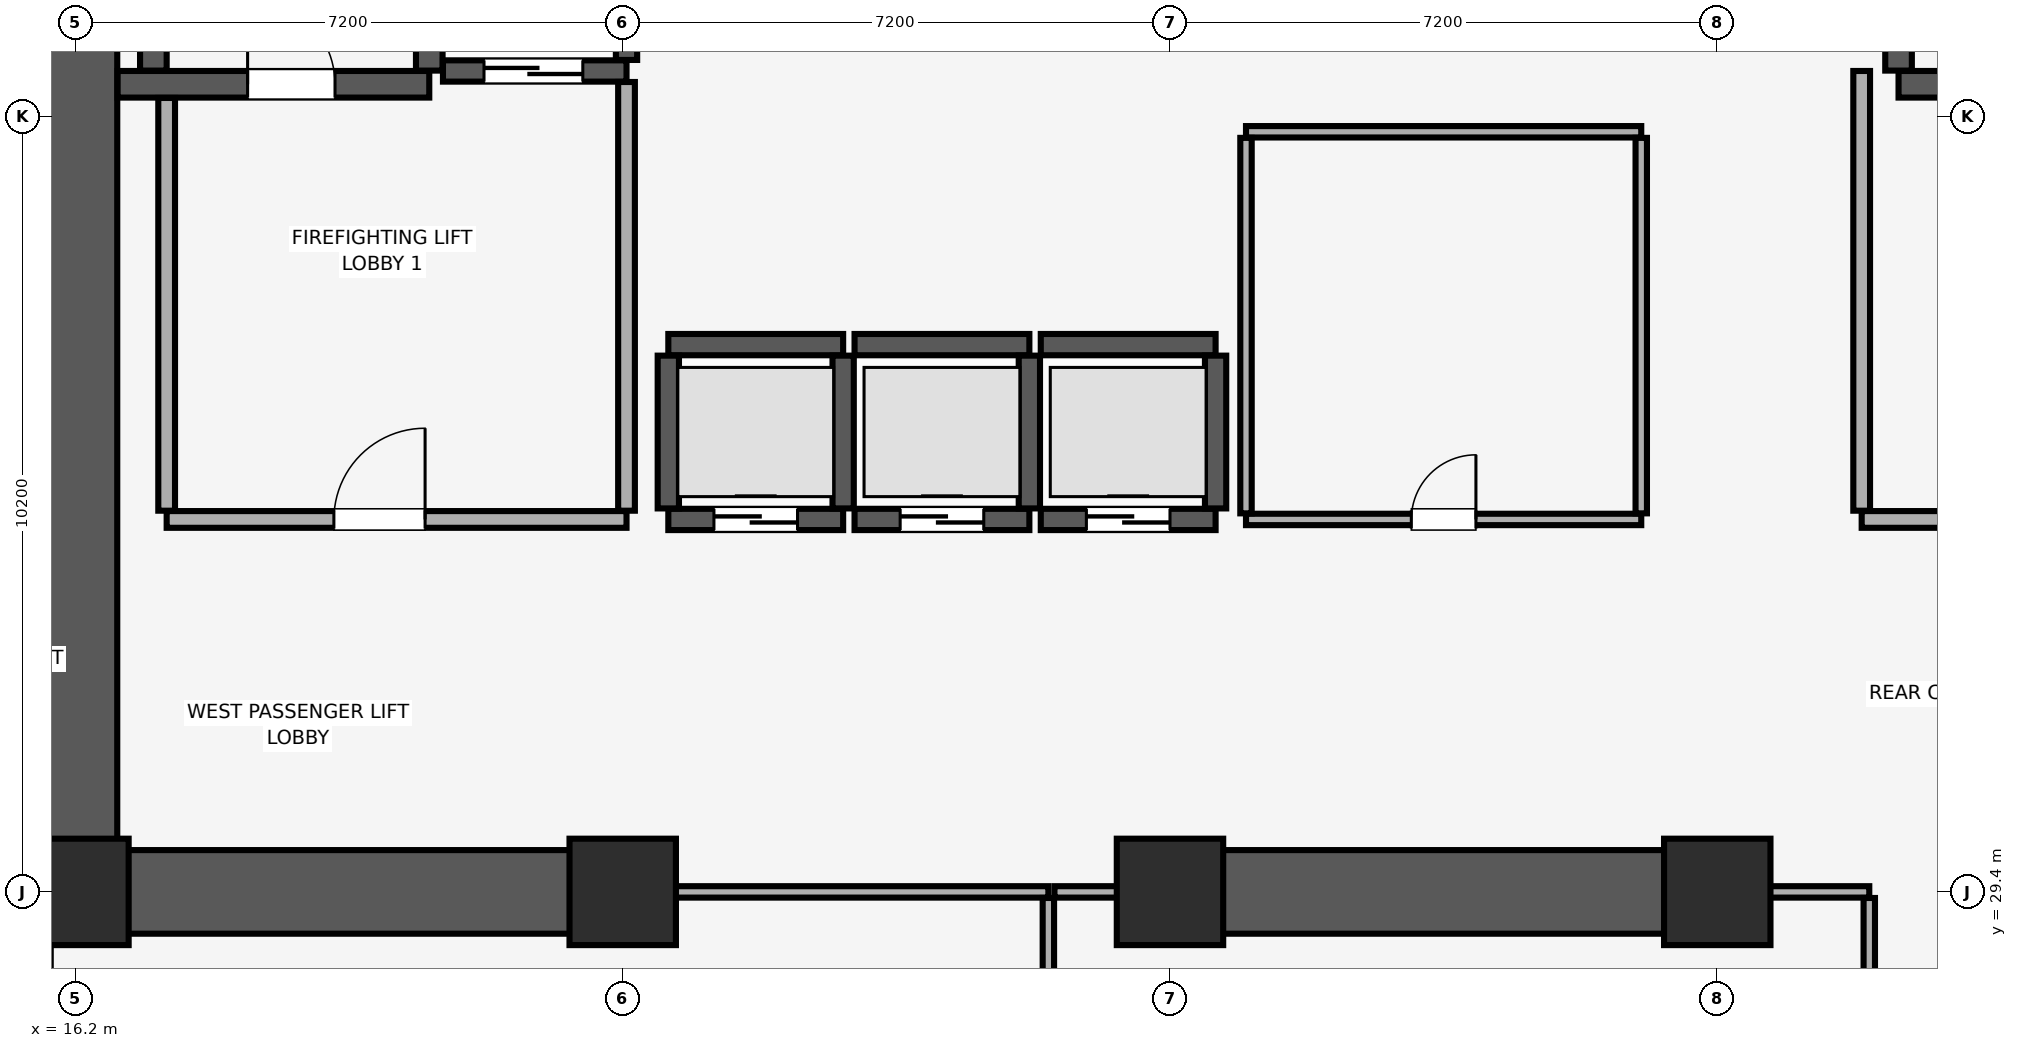
"""IFC4 building model, lengths in metres.
Left out: names, types, materials, properties, quantities, classifications, styles, units other than length and angle.
Written with IfcOpenShell. Run it as: python <this file> out.ifc"""

import sys

from ifc_helpers import new_model, si_unit, direction, frame, frame_2d, origin, origin_2d, place, context, subcontext, project, spatial, rectangle, extrude, element, fill, save


model = new_model("IFC4")
c1 = context("Model", 3, precision=1e-05, world=origin(), true_north=direction((0.0, 1.0)))
c2 = subcontext(c1, "Body", "Model", "MODEL_VIEW")
j1 = project(units=[si_unit("LENGTHUNIT", "METRE"), si_unit("PLANEANGLEUNIT", "RADIAN")], contexts=[c1])
p1 = place(None, origin())
s1 = spatial("IfcSite", under=j1, at=p1, CompositionType="ELEMENT")
p2 = place(p1, origin())
s2 = spatial("IfcBuilding", under=s1, at=p2, CompositionType="ELEMENT")
p3 = place(p2, frame((0.0, 0.0, 57.65)))
s3 = spatial("IfcBuildingStorey", under=s2, at=p3, CompositionType="ELEMENT", Elevation=57.65)
for number, where, z_axis, x_axis in (
    (1, (16.2, 29.4, 0.0), (0.0, 0.0, 1.0), (1.0, 0.0, 0.0)),
    (2, (23.4, 29.4, 0.0), (0.0, 0.0, 1.0), (1.0, 0.0, 0.0)),
    (3, (30.6, 29.4, 0.0), (0.0, 0.0, 1.0), (1.0, 0.0, 0.0)),
    (4, (37.8, 29.4, 0.0), (0.0, 0.0, 1.0), (1.0, 0.0, 0.0)),
):
    element("IfcColumn", number, at=place(p3, frame(where, z_axis=z_axis, x_axis=x_axis)), inside=s3, PredefinedType="COLUMN", context=c2, shape_type="SweptSolid", body=[
        extrude(rectangle(XDim=1.4, YDim=1.4, at=origin_2d()), origin(), (0.0, 0.0, 1.0), 3.51),
    ])
p4 = place(p3, frame((16.2, 29.4, 0.0), z_axis=(0.0, 0.0, 1.0), x_axis=(0.0, 1.0, 0.0)))
e5 = element("IfcWall", 5, at=p4, inside=s3, PredefinedType="SHEAR", context=c2, shape_type="SweptSolid", body=[
    extrude(rectangle(XDim=19.2, YDim=1.1, at=frame_2d((9.6, 0.0))), origin(), (0.0, 0.0, 1.0), 3.51),
])
p5 = place(p3, frame((16.755, 29.4, 0.0), z_axis=(0.0, 0.0, 1.0), x_axis=(1.0, 0.0, 0.0)))
e6 = element("IfcWall", 6, at=p5, inside=s3, PredefinedType="SHEAR", context=c2, shape_type="SweptSolid", body=[
    extrude(rectangle(XDim=6.845, YDim=1.1, at=frame_2d((3.423, 0.0))), origin(), (0.0, 0.0, 1.0), 3.51),
])
p6 = place(p3, frame((30.4, 29.4, 0.0), z_axis=(0.0, 0.0, 1.0), x_axis=(1.0, 0.0, 0.0)))
e7 = element("IfcWall", 7, at=p6, inside=s3, PredefinedType="SHEAR", context=c2, shape_type="SweptSolid", body=[
    extrude(rectangle(XDim=7.6, YDim=1.1, at=frame_2d((3.8, 0.0))), origin(), (0.0, 0.0, 1.0), 3.51),
])
p7 = place(p3, frame((16.755, 40.025, 0.0), z_axis=(0.0, 0.0, 1.0), x_axis=(1.0, 0.0, 0.0)))
e8 = element("IfcWall", 8, at=p7, inside=s3, PredefinedType="SHEAR", context=c2, shape_type="SweptSolid", body=[
    extrude(rectangle(XDim=4.1, YDim=0.35, at=frame_2d((2.05, 0.0))), origin(), (0.0, 0.0, 1.0), 3.51),
])
p8 = place(p7, frame((1.71, 0.0, 0.0)))
e9 = element("IfcOpeningElement", 9, at=p8, cuts=e8, PredefinedType="OPENING", context=c2, shape_type="SweptSolid", body=[
    extrude(rectangle(XDim=1.15, YDim=2.15, at=frame_2d((0.575, 1.075))), frame((0.0, 0.185, 0.0), z_axis=(0.0, -1.0, 0.0), x_axis=(1.0, 0.0, 0.0)), (0.0, 0.0, 1.0), 0.37),
])
for number, where, z_axis, x_axis in (
    (10, (17.225, 40.205, 0.0), (0.0, 0.0, 1.0), (0.0, 1.0, 0.0)),
    (11, (20.855, 40.205, 0.0), (0.0, 0.0, 1.0), (0.0, 1.0, 0.0)),
):
    element("IfcWall", number, at=place(p3, frame(where, z_axis=z_axis, x_axis=x_axis)), inside=s3, PredefinedType="SHEAR", context=c2, shape_type="SweptSolid", body=[
        extrude(rectangle(XDim=8.09, YDim=0.35, at=frame_2d((4.045, 0.0))), origin(), (0.0, 0.0, 1.0), 3.51),
    ])
p9 = place(p3, frame((40.185, 40.025, 0.0), z_axis=(0.0, 0.0, 1.0), x_axis=(1.0, 0.0, 0.0)))
e12 = element("IfcWall", 12, at=p9, inside=s3, PredefinedType="SHEAR", context=c2, shape_type="SweptSolid", body=[
    extrude(rectangle(XDim=3.63, YDim=0.35, at=frame_2d((1.815, 0.0))), origin(), (0.0, 0.0, 1.0), 3.51),
])
p10 = place(p9, frame((1.24, 0.0, 0.0)))
e13 = element("IfcOpeningElement", 13, at=p10, cuts=e12, PredefinedType="OPENING", context=c2, shape_type="SweptSolid", body=[
    extrude(rectangle(XDim=1.15, YDim=2.15, at=frame_2d((0.575, 1.075))), frame((0.0, 0.185, 0.0), z_axis=(0.0, -1.0, 0.0), x_axis=(1.0, 0.0, 0.0)), (0.0, 0.0, 1.0), 0.37),
])
p11 = place(p3, frame((40.185, 40.205, 0.0), z_axis=(0.0, 0.0, 1.0), x_axis=(0.0, 1.0, 0.0)))
e14 = element("IfcWall", 14, at=p11, inside=s3, PredefinedType="SHEAR", context=c2, shape_type="SweptSolid", body=[
    extrude(rectangle(XDim=8.09, YDim=0.35, at=frame_2d((4.045, 0.0))), origin(), (0.0, 0.0, 1.0), 3.51),
])
p12 = place(p3, frame((24.0, 34.3, 0.0), z_axis=(0.0, 0.0, 1.0), x_axis=(1.0, 0.0, 0.0)))
e15 = element("IfcWall", 15, at=p12, inside=s3, PredefinedType="SHEAR", context=c2, shape_type="SweptSolid", body=[
    extrude(rectangle(XDim=2.3, YDim=0.28, at=frame_2d((1.15, 0.0))), origin(), (0.0, 0.0, 1.0), 3.51),
])
p13 = place(p12, frame((0.6, 0.0, 0.0)))
e16 = element("IfcOpeningElement", 16, at=p13, cuts=e15, PredefinedType="OPENING", context=c2, shape_type="SweptSolid", body=[
    extrude(rectangle(XDim=1.1, YDim=2.2, at=frame_2d((0.55, 1.1))), frame((0.0, 0.15, 0.0), z_axis=(0.0, -1.0, 0.0), x_axis=(1.0, 0.0, 0.0)), (0.0, 0.0, 1.0), 0.3),
])
p14 = place(p3, frame((24.0, 36.6, 0.0), z_axis=(0.0, 0.0, 1.0), x_axis=(1.0, 0.0, 0.0)))
e17 = element("IfcWall", 17, at=p14, inside=s3, PredefinedType="SHEAR", context=c2, shape_type="SweptSolid", body=[
    extrude(rectangle(XDim=2.3, YDim=0.28, at=frame_2d((1.15, 0.0))), origin(), (0.0, 0.0, 1.0), 3.51),
])
for number, where, z_axis, x_axis in (
    (18, (24.0, 34.445, 0.0), (0.0, 0.0, 1.0), (0.0, 1.0, 0.0)),
    (19, (26.3, 34.445, 0.0), (0.0, 0.0, 1.0), (0.0, 1.0, 0.0)),
):
    element("IfcWall", number, at=place(p3, frame(where, z_axis=z_axis, x_axis=x_axis)), inside=s3, PredefinedType="SHEAR", context=c2, shape_type="SweptSolid", body=[
        extrude(rectangle(XDim=2.01, YDim=0.28, at=frame_2d((1.005, 0.0))), origin(), (0.0, 0.0, 1.0), 3.51),
    ])
p15 = place(p3, frame((26.45, 34.3, 0.0), z_axis=(0.0, 0.0, 1.0), x_axis=(1.0, 0.0, 0.0)))
e20 = element("IfcWall", 20, at=p15, inside=s3, PredefinedType="SHEAR", context=c2, shape_type="SweptSolid", body=[
    extrude(rectangle(XDim=2.3, YDim=0.28, at=frame_2d((1.15, 0.0))), origin(), (0.0, 0.0, 1.0), 3.51),
])
p16 = place(p15, frame((0.6, 0.0, 0.0)))
e21 = element("IfcOpeningElement", 21, at=p16, cuts=e20, PredefinedType="OPENING", context=c2, shape_type="SweptSolid", body=[
    extrude(rectangle(XDim=1.1, YDim=2.2, at=frame_2d((0.55, 1.1))), frame((0.0, 0.15, 0.0), z_axis=(0.0, -1.0, 0.0), x_axis=(1.0, 0.0, 0.0)), (0.0, 0.0, 1.0), 0.3),
])
p17 = place(p3, frame((26.45, 36.6, 0.0), z_axis=(0.0, 0.0, 1.0), x_axis=(1.0, 0.0, 0.0)))
e22 = element("IfcWall", 22, at=p17, inside=s3, PredefinedType="SHEAR", context=c2, shape_type="SweptSolid", body=[
    extrude(rectangle(XDim=2.3, YDim=0.28, at=frame_2d((1.15, 0.0))), origin(), (0.0, 0.0, 1.0), 3.51),
])
p18 = place(p3, frame((28.75, 34.445, 0.0), z_axis=(0.0, 0.0, 1.0), x_axis=(0.0, 1.0, 0.0)))
e23 = element("IfcWall", 23, at=p18, inside=s3, PredefinedType="SHEAR", context=c2, shape_type="SweptSolid", body=[
    extrude(rectangle(XDim=2.01, YDim=0.28, at=frame_2d((1.005, 0.0))), origin(), (0.0, 0.0, 1.0), 3.51),
])
p19 = place(p3, frame((28.9, 34.3, 0.0), z_axis=(0.0, 0.0, 1.0), x_axis=(1.0, 0.0, 0.0)))
e24 = element("IfcWall", 24, at=p19, inside=s3, PredefinedType="SHEAR", context=c2, shape_type="SweptSolid", body=[
    extrude(rectangle(XDim=2.3, YDim=0.28, at=frame_2d((1.15, 0.0))), origin(), (0.0, 0.0, 1.0), 3.51),
])
p20 = place(p19, frame((0.6, 0.0, 0.0)))
e25 = element("IfcOpeningElement", 25, at=p20, cuts=e24, PredefinedType="OPENING", context=c2, shape_type="SweptSolid", body=[
    extrude(rectangle(XDim=1.1, YDim=2.2, at=frame_2d((0.55, 1.1))), frame((0.0, 0.15, 0.0), z_axis=(0.0, -1.0, 0.0), x_axis=(1.0, 0.0, 0.0)), (0.0, 0.0, 1.0), 0.3),
])
p21 = place(p3, frame((28.9, 36.6, 0.0), z_axis=(0.0, 0.0, 1.0), x_axis=(1.0, 0.0, 0.0)))
e26 = element("IfcWall", 26, at=p21, inside=s3, PredefinedType="SHEAR", context=c2, shape_type="SweptSolid", body=[
    extrude(rectangle(XDim=2.3, YDim=0.28, at=frame_2d((1.15, 0.0))), origin(), (0.0, 0.0, 1.0), 3.51),
])
p22 = place(p3, frame((31.2, 34.445, 0.0), z_axis=(0.0, 0.0, 1.0), x_axis=(0.0, 1.0, 0.0)))
e27 = element("IfcWall", 27, at=p22, inside=s3, PredefinedType="SHEAR", context=c2, shape_type="SweptSolid", body=[
    extrude(rectangle(XDim=2.01, YDim=0.28, at=frame_2d((1.005, 0.0))), origin(), (0.0, 0.0, 1.0), 3.51),
])
p23 = place(p3, frame((21.035, 40.2, 0.0), z_axis=(0.0, 0.0, 1.0), x_axis=(1.0, 0.0, 0.0)))
e28 = element("IfcWall", 28, at=p23, inside=s3, PredefinedType="SHEAR", context=c2, shape_type="SweptSolid", body=[
    extrude(rectangle(XDim=2.415, YDim=0.28, at=frame_2d((1.208, 0.0))), origin(), (0.0, 0.0, 1.0), 3.51),
])
p24 = place(p23, frame((0.54, 0.0, 0.0)))
e29 = element("IfcOpeningElement", 29, at=p24, cuts=e28, PredefinedType="OPENING", context=c2, shape_type="SweptSolid", body=[
    extrude(rectangle(XDim=1.3, YDim=2.3, at=frame_2d((0.65, 1.15))), frame((0.0, 0.15, 0.0), z_axis=(0.0, -1.0, 0.0), x_axis=(1.0, 0.0, 0.0)), (0.0, 0.0, 1.0), 0.3),
])
p25 = place(p3, frame((23.45, 40.345, 0.0), z_axis=(0.0, 0.0, 1.0), x_axis=(0.0, 1.0, 0.0)))
e30 = element("IfcWall", 30, at=p25, inside=s3, PredefinedType="SHEAR", context=c2, shape_type="SweptSolid", body=[
    extrude(rectangle(XDim=2.81, YDim=0.28, at=frame_2d((1.405, 0.0))), origin(), (0.0, 0.0, 1.0), 3.51),
])
p26 = place(p3, frame((17.4, 34.3, 0.0), z_axis=(0.0, 0.0, 1.0), x_axis=(1.0, 0.0, 0.0)))
e31 = element("IfcWall", 31, at=p26, inside=s3, PredefinedType="PARTITIONING", context=c2, shape_type="SweptSolid", body=[
    extrude(rectangle(XDim=6.05, YDim=0.22, at=frame_2d((3.025, 0.0))), origin(), (0.0, 0.0, 1.0), 3.51),
])
p27 = place(p26, frame((2.2, 0.0, 0.0)))
e32 = element("IfcOpeningElement", 32, at=p27, cuts=e31, PredefinedType="OPENING", context=c2, shape_type="SweptSolid", body=[
    extrude(rectangle(XDim=1.2, YDim=2.15, at=frame_2d((0.6, 1.075))), frame((0.0, 0.12, 0.0), z_axis=(0.0, -1.0, 0.0), x_axis=(1.0, 0.0, 0.0)), (0.0, 0.0, 1.0), 0.24),
])
p28 = place(p3, frame((17.4, 34.415, 0.0), z_axis=(0.0, 0.0, 1.0), x_axis=(0.0, 1.0, 0.0)))
e33 = element("IfcWall", 33, at=p28, inside=s3, PredefinedType="PARTITIONING", context=c2, shape_type="SweptSolid", body=[
    extrude(rectangle(XDim=5.43, YDim=0.22, at=frame_2d((2.715, 0.0))), origin(), (0.0, 0.0, 1.0), 3.51),
])
p29 = place(p3, frame((23.45, 34.415, 0.0), z_axis=(0.0, 0.0, 1.0), x_axis=(0.0, 1.0, 0.0)))
e34 = element("IfcWall", 34, at=p29, inside=s3, PredefinedType="PARTITIONING", context=c2, shape_type="SweptSolid", body=[
    extrude(rectangle(XDim=5.64, YDim=0.22, at=frame_2d((2.82, 0.0))), origin(), (0.0, 0.0, 1.0), 3.51),
])
p30 = place(p3, frame((39.7, 34.3, 0.0), z_axis=(0.0, 0.0, 1.0), x_axis=(1.0, 0.0, 0.0)))
e35 = element("IfcWall", 35, at=p30, inside=s3, PredefinedType="PARTITIONING", context=c2, shape_type="SweptSolid", body=[
    extrude(rectangle(XDim=4.6, YDim=0.22, at=frame_2d((2.3, 0.0))), origin(), (0.0, 0.0, 1.0), 3.51),
])
p31 = place(p30, frame((1.7, 0.0, 0.0)))
e36 = element("IfcOpeningElement", 36, at=p31, cuts=e35, PredefinedType="OPENING", context=c2, shape_type="SweptSolid", body=[
    extrude(rectangle(XDim=1.2, YDim=2.15, at=frame_2d((0.6, 1.075))), frame((0.0, 0.12, 0.0), z_axis=(0.0, -1.0, 0.0), x_axis=(1.0, 0.0, 0.0)), (0.0, 0.0, 1.0), 0.24),
])
p32 = place(p3, frame((39.7, 34.415, 0.0), z_axis=(0.0, 0.0, 1.0), x_axis=(0.0, 1.0, 0.0)))
e37 = element("IfcWall", 37, at=p32, inside=s3, PredefinedType="PARTITIONING", context=c2, shape_type="SweptSolid", body=[
    extrude(rectangle(XDim=5.785, YDim=0.22, at=frame_2d((2.893, 0.0))), origin(), (0.0, 0.0, 1.0), 3.51),
])
p33 = place(p3, frame((31.6, 34.3, 0.0), z_axis=(0.0, 0.0, 1.0), x_axis=(1.0, 0.0, 0.0)))
e38 = element("IfcWall", 38, at=p33, inside=s3, PredefinedType="PARTITIONING", context=c2, shape_type="SweptSolid", body=[
    extrude(rectangle(XDim=5.2, YDim=0.15, at=frame_2d((2.6, 0.0))), origin(), (0.0, 0.0, 1.0), 3.51),
])
p34 = place(p33, frame((2.175, 0.0, 0.0)))
e39 = element("IfcOpeningElement", 39, at=p34, cuts=e38, PredefinedType="OPENING", context=c2, shape_type="SweptSolid", body=[
    extrude(rectangle(XDim=0.85, YDim=2.1, at=frame_2d((0.425, 1.05))), frame((0.0, 0.085, 0.0), z_axis=(0.0, -1.0, 0.0), x_axis=(1.0, 0.0, 0.0)), (0.0, 0.0, 1.0), 0.17),
])
p35 = place(p3, frame((31.6, 39.4, 0.0), z_axis=(0.0, 0.0, 1.0), x_axis=(1.0, 0.0, 0.0)))
e40 = element("IfcWall", 40, at=p35, inside=s3, PredefinedType="PARTITIONING", context=c2, shape_type="SweptSolid", body=[
    extrude(rectangle(XDim=5.2, YDim=0.15, at=frame_2d((2.6, 0.0))), origin(), (0.0, 0.0, 1.0), 3.51),
])
for number, where, z_axis, x_axis in (
    (41, (31.6, 34.38, 0.0), (0.0, 0.0, 1.0), (0.0, 1.0, 0.0)),
    (42, (36.8, 34.38, 0.0), (0.0, 0.0, 1.0), (0.0, 1.0, 0.0)),
):
    element("IfcWall", number, at=place(p3, frame(where, z_axis=z_axis, x_axis=x_axis)), inside=s3, PredefinedType="PARTITIONING", context=c2, shape_type="SweptSolid", body=[
        extrude(rectangle(XDim=4.94, YDim=0.15, at=frame_2d((2.47, 0.0))), origin(), (0.0, 0.0, 1.0), 3.51),
    ])
p36 = place(p3, frame((23.61, 29.4, 0.0), z_axis=(0.0, 0.0, 1.0), x_axis=(1.0, 0.0, 0.0)))
e43 = element("IfcWall", 43, at=p36, inside=s3, PredefinedType="PARTITIONING", context=c2, shape_type="SweptSolid", body=[
    extrude(rectangle(XDim=5.39, YDim=0.15, at=frame_2d((2.695, 0.0))), origin(), (0.0, 0.0, 1.0), 2.41),
])
p37 = place(p3, frame((29.0, 13.53, 0.0), z_axis=(0.0, 0.0, 1.0), x_axis=(0.0, 1.0, 0.0)))
e44 = element("IfcWall", 44, at=p37, inside=s3, PredefinedType="PARTITIONING", context=c2, shape_type="SweptSolid", body=[
    extrude(rectangle(XDim=15.79, YDim=0.15, at=frame_2d((7.895, 0.0))), origin(), (0.0, 0.0, 1.0), 3.51),
])
p38 = place(p3, frame((29.08, 29.4, 0.0), z_axis=(0.0, 0.0, 1.0), x_axis=(1.0, 0.0, 0.0)))
e45 = element("IfcWall", 45, at=p38, inside=s3, PredefinedType="PARTITIONING", context=c2, shape_type="SweptSolid", body=[
    extrude(rectangle(XDim=1.31, YDim=0.15, at=frame_2d((0.655, 0.0))), origin(), (0.0, 0.0, 1.0), 2.41),
])
p39 = place(p3, frame((38.01, 29.4, 0.0), z_axis=(0.0, 0.0, 1.0), x_axis=(1.0, 0.0, 0.0)))
e46 = element("IfcWall", 46, at=p39, inside=s3, PredefinedType="PARTITIONING", context=c2, shape_type="SweptSolid", body=[
    extrude(rectangle(XDim=1.79, YDim=0.15, at=frame_2d((0.895, 0.0))), origin(), (0.0, 0.0, 1.0), 2.41),
])
p40 = place(p3, frame((39.8, 13.53, 0.0), z_axis=(0.0, 0.0, 1.0), x_axis=(0.0, 1.0, 0.0)))
e47 = element("IfcWall", 47, at=p40, inside=s3, PredefinedType="PARTITIONING", context=c2, shape_type="SweptSolid", body=[
    extrude(rectangle(XDim=15.79, YDim=0.15, at=frame_2d((7.895, 0.0))), origin(), (0.0, 0.0, 1.0), 3.51),
])
p41 = place(p8, origin())
e48 = element("IfcDoor", 48, at=p41, inside=s3, OperationType="SINGLE_SWING_LEFT", PredefinedType="DOOR", context=c2, shape_type="SweptSolid", body=[
    extrude(rectangle(XDim=1.15, YDim=2.15, at=frame_2d((0.575, 1.075))), frame((0.0, 0.025, 0.0), z_axis=(0.0, -1.0, 0.0), x_axis=(1.0, 0.0, 0.0)), (0.0, 0.0, 1.0), 0.05),
])
fill(e9, e48)
p42 = place(p13, origin())
e49 = element("IfcDoor", 49, at=p42, inside=s3, OperationType="DOUBLE_DOOR_SLIDING", PredefinedType="DOOR", context=c2, shape_type="SweptSolid", body=[
    extrude(rectangle(XDim=1.1, YDim=2.2, at=frame_2d((0.55, 1.1))), frame((0.0, 0.025, 0.0), z_axis=(0.0, -1.0, 0.0), x_axis=(1.0, 0.0, 0.0)), (0.0, 0.0, 1.0), 0.05),
])
fill(e16, e49)
p43 = place(p16, origin())
e50 = element("IfcDoor", 50, at=p43, inside=s3, OperationType="DOUBLE_DOOR_SLIDING", PredefinedType="DOOR", context=c2, shape_type="SweptSolid", body=[
    extrude(rectangle(XDim=1.1, YDim=2.2, at=frame_2d((0.55, 1.1))), frame((0.0, 0.025, 0.0), z_axis=(0.0, -1.0, 0.0), x_axis=(1.0, 0.0, 0.0)), (0.0, 0.0, 1.0), 0.05),
])
fill(e21, e50)
p44 = place(p20, origin())
e51 = element("IfcDoor", 51, at=p44, inside=s3, OperationType="DOUBLE_DOOR_SLIDING", PredefinedType="DOOR", context=c2, shape_type="SweptSolid", body=[
    extrude(rectangle(XDim=1.1, YDim=2.2, at=frame_2d((0.55, 1.1))), frame((0.0, 0.025, 0.0), z_axis=(0.0, -1.0, 0.0), x_axis=(1.0, 0.0, 0.0)), (0.0, 0.0, 1.0), 0.05),
])
fill(e25, e51)
p45 = place(p24, origin())
e52 = element("IfcDoor", 52, at=p45, inside=s3, OperationType="DOUBLE_DOOR_SLIDING", PredefinedType="DOOR", context=c2, shape_type="SweptSolid", body=[
    extrude(rectangle(XDim=1.3, YDim=2.3, at=frame_2d((0.65, 1.15))), frame((0.0, 0.025, 0.0), z_axis=(0.0, -1.0, 0.0), x_axis=(1.0, 0.0, 0.0)), (0.0, 0.0, 1.0), 0.05),
])
fill(e29, e52)
p46 = place(p27, origin())
e53 = element("IfcDoor", 53, at=p46, inside=s3, OperationType="SINGLE_SWING_RIGHT", PredefinedType="DOOR", context=c2, shape_type="SweptSolid", body=[
    extrude(rectangle(XDim=1.2, YDim=2.15, at=frame_2d((0.6, 1.075))), frame((0.0, 0.025, 0.0), z_axis=(0.0, -1.0, 0.0), x_axis=(1.0, 0.0, 0.0)), (0.0, 0.0, 1.0), 0.05),
])
fill(e32, e53)
p47 = place(p34, origin())
e54 = element("IfcDoor", 54, at=p47, inside=s3, OperationType="SINGLE_SWING_RIGHT", PredefinedType="DOOR", context=c2, shape_type="SweptSolid", body=[
    extrude(rectangle(XDim=0.85, YDim=2.1, at=frame_2d((0.425, 1.05))), frame((0.0, 0.025, 0.0), z_axis=(0.0, -1.0, 0.0), x_axis=(1.0, 0.0, 0.0)), (0.0, 0.0, 1.0), 0.05),
])
fill(e39, e54)
save(model, sys.argv[1])
